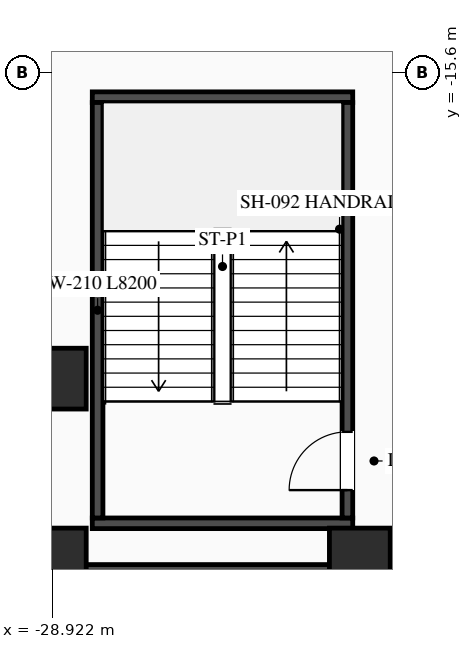
"""IFC4 building model, lengths in metres.
Left out: names, types, materials, properties, quantities, classifications, styles, units other than length and angle.
Written with IfcOpenShell. Run it as: python <this file> out.ifc"""

import sys

from ifc_helpers import new_model, si_unit, direction, frame, frame_2d, origin, origin_2d, place, context, subcontext, project, spatial, rectangle, extrude, element, fill, save


model = new_model("IFC4")
c1 = context("Model", 3, precision=1e-05, world=origin(), true_north=direction((0.0, 1.0)))
c2 = subcontext(c1, "Body", "Model", "MODEL_VIEW")
j1 = project(units=[si_unit("LENGTHUNIT", "METRE"), si_unit("PLANEANGLEUNIT", "RADIAN")], contexts=[c1])
p1 = place(None, origin())
s1 = spatial("IfcSite", under=j1, at=p1, CompositionType="ELEMENT")
p2 = place(p1, origin())
s2 = spatial("IfcBuilding", under=s1, at=p2, CompositionType="ELEMENT")
p3 = place(p2, frame((0.0, 0.0, -4.8)))
s3 = spatial("IfcBuildingStorey", under=s2, at=p3, CompositionType="ELEMENT", Elevation=-4.8)
p4 = place(p3, frame((-39.0, -25.66, 0.0), z_axis=(0.0, 0.0, 1.0), x_axis=(1.0, 0.0, 0.0)))
e1 = element("IfcWall", 1, at=p4, inside=s3, PredefinedType="SOLIDWALL", context=c2, shape_type="SweptSolid", body=[
    extrude(rectangle(XDim=78.0, YDim=0.68, at=frame_2d((39.0, 0.0))), origin(), (0.0, 0.0, 1.0), 4.45),
])
for number, where, z_axis, x_axis in (
    (2, (-28.13, -24.505, 0.0), (0.0, 0.0, 1.0), (1.0, 0.0, 0.0)),
    (3, (-28.13, -16.095, 0.0), (0.0, 0.0, 1.0), (1.0, 0.0, 0.0)),
):
    element("IfcWall", number, at=place(p3, frame(where, z_axis=z_axis, x_axis=x_axis)), inside=s3, PredefinedType="SHEAR", context=c2, shape_type="SweptSolid", body=[
        extrude(rectangle(XDim=5.14, YDim=0.21, at=frame_2d((2.57, 0.0))), origin(), (0.0, 0.0, 1.0), 4.45),
    ])
p5 = place(p3, frame((-28.025, -24.4, 0.0), z_axis=(0.0, 0.0, 1.0), x_axis=(0.0, 1.0, 0.0)))
e4 = element("IfcWall", 4, at=p5, inside=s3, PredefinedType="SHEAR", context=c2, shape_type="SweptSolid", body=[
    extrude(rectangle(XDim=8.2, YDim=0.21, at=frame_2d((4.1, 0.0))), origin(), (0.0, 0.0, 1.0), 4.45),
])
p6 = place(p3, frame((-23.095, -24.4, 0.0), z_axis=(0.0, 0.0, 1.0), x_axis=(0.0, 1.0, 0.0)))
e5 = element("IfcWall", 5, at=p6, inside=s3, PredefinedType="SHEAR", context=c2, shape_type="SweptSolid", body=[
    extrude(rectangle(XDim=8.2, YDim=0.21, at=frame_2d((4.1, 0.0))), origin(), (0.0, 0.0, 1.0), 4.45),
])
p7 = place(p6, frame((0.55, 0.0, 0.0)))
e6 = element("IfcOpeningElement", 6, at=p7, cuts=e5, PredefinedType="OPENING", context=c2, shape_type="SweptSolid", body=[
    extrude(rectangle(XDim=1.15, YDim=2.1, at=frame_2d((0.575, 1.05))), frame((0.0, 0.115, 0.0), z_axis=(0.0, -1.0, 0.0), x_axis=(1.0, 0.0, 0.0)), (0.0, 0.0, 1.0), 0.23),
])
for number, where, z_axis, x_axis in (
    (7, (-28.85, -21.65, 0.0), (0.0, 0.0, 1.0), (1.0, 0.0, 0.0)),
    (8, (-28.85, -25.2, 0.0), (0.0, 0.0, 1.0), (1.0, 0.0, 0.0)),
    (9, (-22.85, -25.2, 0.0), (0.0, 0.0, 1.0), (1.0, 0.0, 0.0)),
):
    element("IfcColumn", number, at=place(p3, frame(where, z_axis=z_axis, x_axis=x_axis)), inside=s3, PredefinedType="COLUMN", context=c2, shape_type="SweptSolid", body=[
        extrude(rectangle(XDim=1.2, YDim=1.2, at=origin_2d()), origin(), (0.0, 0.0, 1.0), 4.8),
    ])
p8 = place(p7, origin())
e10 = element("IfcDoor", 10, at=p8, inside=s3, OperationType="SINGLE_SWING_LEFT", PredefinedType="DOOR", context=c2, shape_type="SweptSolid", body=[
    extrude(rectangle(XDim=1.15, YDim=2.1, at=frame_2d((0.575, 1.05))), frame((0.0, 0.025, 0.0), z_axis=(0.0, -1.0, 0.0), x_axis=(1.0, 0.0, 0.0)), (0.0, 0.0, 1.0), 0.05),
])
fill(e6, e10)
save(model, sys.argv[1])
